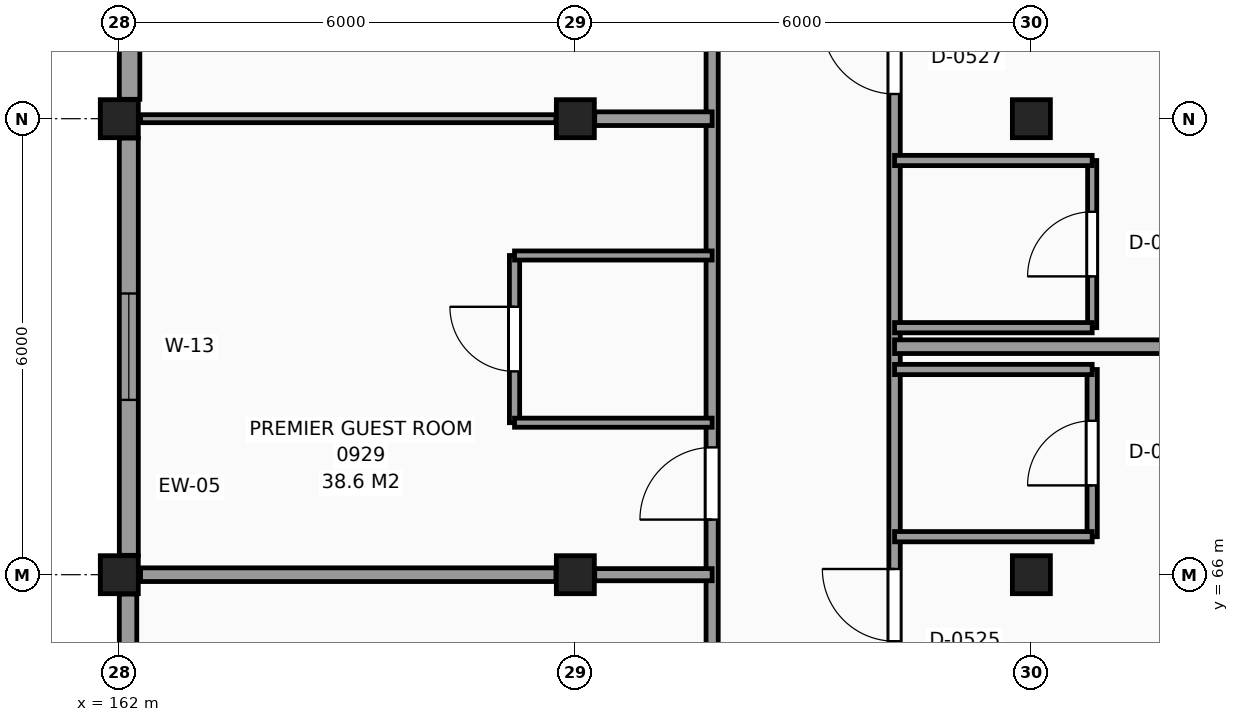
"""IFC4 building model, lengths in metres.
Left out: names, types, materials, properties, quantities, classifications, styles, units other than length and angle.
Written with IfcOpenShell. Run it as: python <this file> out.ifc"""

import sys

from ifc_helpers import new_model, si_unit, direction, frame, frame_2d, origin, origin_2d, place, context, subcontext, project, spatial, rectangle, extrude, element, fill, save


model = new_model("IFC4")
c1 = context("Model", 3, precision=1e-05, world=origin(), true_north=direction((0.0, 1.0)))
c2 = subcontext(c1, "Body", "Model", "MODEL_VIEW")
j1 = project(units=[si_unit("LENGTHUNIT", "METRE"), si_unit("PLANEANGLEUNIT", "RADIAN")], contexts=[c1])
p1 = place(None, origin())
s1 = spatial("IfcSite", under=j1, at=p1, CompositionType="ELEMENT")
p2 = place(p1, origin())
s2 = spatial("IfcBuilding", under=s1, at=p2, CompositionType="ELEMENT")
p3 = place(p2, frame((0.0, 0.0, 38.1)))
s3 = spatial("IfcBuildingStorey", under=s2, at=p3, CompositionType="ELEMENT", Elevation=38.1)
for number, where, z_axis, x_axis in (
    (1, (162.0, 66.0, 0.0), (0.0, 0.0, 1.0), (1.0, 0.0, 0.0)),
    (2, (162.0, 72.0, 0.0), (0.0, 0.0, 1.0), (1.0, 0.0, 0.0)),
    (3, (168.0, 66.0, 0.0), (0.0, 0.0, 1.0), (1.0, 0.0, 0.0)),
    (4, (168.0, 72.0, 0.0), (0.0, 0.0, 1.0), (1.0, 0.0, 0.0)),
    (5, (174.0, 66.0, 0.0), (0.0, 0.0, 1.0), (1.0, 0.0, 0.0)),
    (6, (174.0, 72.0, 0.0), (0.0, 0.0, 1.0), (1.0, 0.0, 0.0)),
):
    element("IfcColumn", number, at=place(p3, frame(where, z_axis=z_axis, x_axis=x_axis)), inside=s3, PredefinedType="COLUMN", context=c2, shape_type="SweptSolid", body=[
        extrude(rectangle(XDim=0.5, YDim=0.5, at=origin_2d()), origin(), (0.0, 0.0, 1.0), 3.3),
    ])
p4 = place(p3, frame((162.135, 77.745, 0.0), z_axis=(0.0, 0.0, 1.0), x_axis=(0.0, -1.0, 0.0)))
e7 = element("IfcWall", 7, at=p4, inside=s3, PredefinedType="SOLIDWALL", context=c2, shape_type="SweptSolid", body=[
    extrude(rectangle(XDim=5.49, YDim=0.27, at=frame_2d((2.745, 0.0))), origin(), (0.0, 0.0, 1.0), 2.41),
])
p5 = place(p3, frame((162.125, 71.745, 0.0), z_axis=(0.0, 0.0, 1.0), x_axis=(0.0, -1.0, 0.0)))
e8 = element("IfcWall", 8, at=p5, inside=s3, PredefinedType="SOLIDWALL", context=c2, shape_type="SweptSolid", body=[
    extrude(rectangle(XDim=5.49, YDim=0.25, at=frame_2d((2.745, 0.0))), origin(), (0.0, 0.0, 1.0), 2.41),
])
p6 = place(p5, frame((2.045, 0.0, 0.8)))
e9 = element("IfcOpeningElement", 9, at=p6, cuts=e8, PredefinedType="OPENING", context=c2, shape_type="SweptSolid", body=[
    extrude(rectangle(XDim=1.4, YDim=1.4, at=frame_2d((0.7, 0.7))), frame((0.0, 0.135, 0.0), z_axis=(0.0, -1.0, 0.0), x_axis=(1.0, 0.0, 0.0)), (0.0, 0.0, 1.0), 0.27),
])
p7 = place(p3, frame((162.115, 65.745, 0.0), z_axis=(0.0, 0.0, 1.0), x_axis=(0.0, -1.0, 0.0)))
e10 = element("IfcWall", 10, at=p7, inside=s3, PredefinedType="SOLIDWALL", context=c2, shape_type="SweptSolid", body=[
    extrude(rectangle(XDim=5.49, YDim=0.23, at=frame_2d((2.745, 0.0))), origin(), (0.0, 0.0, 1.0), 2.41),
])
p8 = place(p7, frame((2.045, 0.0, 0.8)))
e11 = element("IfcOpeningElement", 11, at=p8, cuts=e10, PredefinedType="OPENING", context=c2, shape_type="SweptSolid", body=[
    extrude(rectangle(XDim=1.4, YDim=1.4, at=frame_2d((0.7, 0.7))), frame((0.0, 0.125, 0.0), z_axis=(0.0, -1.0, 0.0), x_axis=(1.0, 0.0, 0.0)), (0.0, 0.0, 1.0), 0.25),
])
p9 = place(p3, frame((167.2, 68.0, 0.0), z_axis=(0.0, 0.0, 1.0), x_axis=(0.0, 1.0, 0.0)))
e12 = element("IfcWall", 12, at=p9, inside=s3, PredefinedType="PARTITIONING", context=c2, shape_type="SweptSolid", body=[
    extrude(rectangle(XDim=2.2, YDim=0.135, at=frame_2d((1.1, 0.0))), origin(), (0.0, 0.0, 1.0), 3.06),
])
p10 = place(p9, frame((0.675, 0.0, 0.0)))
e13 = element("IfcOpeningElement", 13, at=p10, cuts=e12, PredefinedType="OPENING", context=c2, shape_type="SweptSolid", body=[
    extrude(rectangle(XDim=0.85, YDim=2.1, at=frame_2d((0.425, 1.05))), frame((0.0, 0.078, 0.0), z_axis=(0.0, -1.0, 0.0), x_axis=(1.0, 0.0, 0.0)), (0.0, 0.0, 1.0), 0.155),
])
p11 = place(p3, frame((169.8, 42.215, 0.0), z_axis=(0.0, 0.0, 1.0), x_axis=(0.0, 1.0, 0.0)))
e14 = element("IfcWall", 14, at=p11, inside=s3, PredefinedType="PARTITIONING", context=c2, shape_type="SweptSolid", body=[
    extrude(rectangle(XDim=65.605, YDim=0.16, at=frame_2d((32.802, 0.0))), origin(), (0.0, 0.0, 1.0), 3.06),
])
p12 = place(p11, frame((50.185, 0.0, 0.0)))
e15 = element("IfcOpeningElement", 15, at=p12, cuts=e14, PredefinedType="OPENING", context=c2, shape_type="SweptSolid", body=[
    extrude(rectangle(XDim=1.2, YDim=2.2, at=frame_2d((0.6, 1.1))), frame((0.0, 0.09, 0.0), z_axis=(0.0, -1.0, 0.0), x_axis=(1.0, 0.0, 0.0)), (0.0, 0.0, 1.0), 0.18),
])
p13 = place(p11, frame((32.285, 0.0, 0.0)))
e16 = element("IfcOpeningElement", 16, at=p13, cuts=e14, PredefinedType="OPENING", context=c2, shape_type="SweptSolid", body=[
    extrude(rectangle(XDim=1.0, YDim=2.15, at=frame_2d((0.5, 1.075))), frame((0.0, 0.09, 0.0), z_axis=(0.0, -1.0, 0.0), x_axis=(1.0, 0.0, 0.0)), (0.0, 0.0, 1.0), 0.18),
])
p14 = place(p11, frame((0.46, 0.0, 0.0)))
e17 = element("IfcOpeningElement", 17, at=p14, cuts=e14, PredefinedType="OPENING", context=c2, shape_type="SweptSolid", body=[
    extrude(rectangle(XDim=0.95, YDim=2.1, at=frame_2d((0.475, 1.05))), frame((0.0, 0.09, 0.0), z_axis=(0.0, -1.0, 0.0), x_axis=(1.0, 0.0, 0.0)), (0.0, 0.0, 1.0), 0.18),
])
p15 = place(p11, frame((6.51, 0.0, 0.0)))
e18 = element("IfcOpeningElement", 18, at=p15, cuts=e14, PredefinedType="OPENING", context=c2, shape_type="SweptSolid", body=[
    extrude(rectangle(XDim=0.95, YDim=2.1, at=frame_2d((0.475, 1.05))), frame((0.0, 0.09, 0.0), z_axis=(0.0, -1.0, 0.0), x_axis=(1.0, 0.0, 0.0)), (0.0, 0.0, 1.0), 0.18),
])
p16 = place(p11, frame((12.51, 0.0, 0.0)))
e19 = element("IfcOpeningElement", 19, at=p16, cuts=e14, PredefinedType="OPENING", context=c2, shape_type="SweptSolid", body=[
    extrude(rectangle(XDim=0.95, YDim=2.1, at=frame_2d((0.475, 1.05))), frame((0.0, 0.09, 0.0), z_axis=(0.0, -1.0, 0.0), x_axis=(1.0, 0.0, 0.0)), (0.0, 0.0, 1.0), 0.18),
])
p17 = place(p11, frame((18.51, 0.0, 0.0)))
e20 = element("IfcOpeningElement", 20, at=p17, cuts=e14, PredefinedType="OPENING", context=c2, shape_type="SweptSolid", body=[
    extrude(rectangle(XDim=0.95, YDim=2.1, at=frame_2d((0.475, 1.05))), frame((0.0, 0.09, 0.0), z_axis=(0.0, -1.0, 0.0), x_axis=(1.0, 0.0, 0.0)), (0.0, 0.0, 1.0), 0.18),
])
p18 = place(p11, frame((24.51, 0.0, 0.0)))
e21 = element("IfcOpeningElement", 21, at=p18, cuts=e14, PredefinedType="OPENING", context=c2, shape_type="SweptSolid", body=[
    extrude(rectangle(XDim=0.95, YDim=2.1, at=frame_2d((0.475, 1.05))), frame((0.0, 0.09, 0.0), z_axis=(0.0, -1.0, 0.0), x_axis=(1.0, 0.0, 0.0)), (0.0, 0.0, 1.0), 0.18),
])
p19 = place(p11, frame((54.51, 0.0, 0.0)))
e22 = element("IfcOpeningElement", 22, at=p19, cuts=e14, PredefinedType="OPENING", context=c2, shape_type="SweptSolid", body=[
    extrude(rectangle(XDim=0.95, YDim=2.1, at=frame_2d((0.475, 1.05))), frame((0.0, 0.09, 0.0), z_axis=(0.0, -1.0, 0.0), x_axis=(1.0, 0.0, 0.0)), (0.0, 0.0, 1.0), 0.18),
])
p20 = place(p11, frame((60.51, 0.0, 0.0)))
e23 = element("IfcOpeningElement", 23, at=p20, cuts=e14, PredefinedType="OPENING", context=c2, shape_type="SweptSolid", body=[
    extrude(rectangle(XDim=0.95, YDim=2.1, at=frame_2d((0.475, 1.05))), frame((0.0, 0.09, 0.0), z_axis=(0.0, -1.0, 0.0), x_axis=(1.0, 0.0, 0.0)), (0.0, 0.0, 1.0), 0.18),
])
p21 = place(p3, frame((172.2, 42.215, 0.0), z_axis=(0.0, 0.0, 1.0), x_axis=(0.0, 1.0, 0.0)))
e24 = element("IfcWall", 24, at=p21, inside=s3, PredefinedType="PARTITIONING", context=c2, shape_type="SweptSolid", body=[
    extrude(rectangle(XDim=65.605, YDim=0.15, at=frame_2d((32.802, 0.0))), origin(), (0.0, 0.0, 1.0), 3.06),
])
p22 = place(p21, frame((0.46, 0.0, 0.0)))
e25 = element("IfcOpeningElement", 25, at=p22, cuts=e24, PredefinedType="OPENING", context=c2, shape_type="SweptSolid", body=[
    extrude(rectangle(XDim=0.95, YDim=2.1, at=frame_2d((0.475, 1.05))), frame((0.0, 0.085, 0.0), z_axis=(0.0, -1.0, 0.0), x_axis=(1.0, 0.0, 0.0)), (0.0, 0.0, 1.0), 0.17),
])
p23 = place(p21, frame((4.91, 0.0, 0.0)))
e26 = element("IfcOpeningElement", 26, at=p23, cuts=e24, PredefinedType="OPENING", context=c2, shape_type="SweptSolid", body=[
    extrude(rectangle(XDim=0.95, YDim=2.1, at=frame_2d((0.475, 1.05))), frame((0.0, 0.085, 0.0), z_axis=(0.0, -1.0, 0.0), x_axis=(1.0, 0.0, 0.0)), (0.0, 0.0, 1.0), 0.17),
])
p24 = place(p21, frame((12.11, 0.0, 0.0)))
e27 = element("IfcOpeningElement", 27, at=p24, cuts=e24, PredefinedType="OPENING", context=c2, shape_type="SweptSolid", body=[
    extrude(rectangle(XDim=0.95, YDim=2.1, at=frame_2d((0.475, 1.05))), frame((0.0, 0.085, 0.0), z_axis=(0.0, -1.0, 0.0), x_axis=(1.0, 0.0, 0.0)), (0.0, 0.0, 1.0), 0.17),
])
p25 = place(p21, frame((20.36, 0.0, 0.0)))
e28 = element("IfcOpeningElement", 28, at=p25, cuts=e24, PredefinedType="OPENING", context=c2, shape_type="SweptSolid", body=[
    extrude(rectangle(XDim=0.95, YDim=2.1, at=frame_2d((0.475, 1.05))), frame((0.0, 0.085, 0.0), z_axis=(0.0, -1.0, 0.0), x_axis=(1.0, 0.0, 0.0)), (0.0, 0.0, 1.0), 0.17),
])
p26 = place(p21, frame((22.91, 0.0, 0.0)))
e29 = element("IfcOpeningElement", 29, at=p26, cuts=e24, PredefinedType="OPENING", context=c2, shape_type="SweptSolid", body=[
    extrude(rectangle(XDim=0.95, YDim=2.1, at=frame_2d((0.475, 1.05))), frame((0.0, 0.085, 0.0), z_axis=(0.0, -1.0, 0.0), x_axis=(1.0, 0.0, 0.0)), (0.0, 0.0, 1.0), 0.17),
])
p27 = place(p21, frame((30.11, 0.0, 0.0)))
e30 = element("IfcOpeningElement", 30, at=p27, cuts=e24, PredefinedType="OPENING", context=c2, shape_type="SweptSolid", body=[
    extrude(rectangle(XDim=0.95, YDim=2.1, at=frame_2d((0.475, 1.05))), frame((0.0, 0.085, 0.0), z_axis=(0.0, -1.0, 0.0), x_axis=(1.0, 0.0, 0.0)), (0.0, 0.0, 1.0), 0.17),
])
p28 = place(p21, frame((34.31, 0.0, 0.0)))
e31 = element("IfcOpeningElement", 31, at=p28, cuts=e24, PredefinedType="OPENING", context=c2, shape_type="SweptSolid", body=[
    extrude(rectangle(XDim=0.95, YDim=2.1, at=frame_2d((0.475, 1.05))), frame((0.0, 0.085, 0.0), z_axis=(0.0, -1.0, 0.0), x_axis=(1.0, 0.0, 0.0)), (0.0, 0.0, 1.0), 0.17),
])
p29 = place(p21, frame((43.61, 0.0, 0.0)))
e32 = element("IfcOpeningElement", 32, at=p29, cuts=e24, PredefinedType="OPENING", context=c2, shape_type="SweptSolid", body=[
    extrude(rectangle(XDim=0.95, YDim=2.1, at=frame_2d((0.475, 1.05))), frame((0.0, 0.085, 0.0), z_axis=(0.0, -1.0, 0.0), x_axis=(1.0, 0.0, 0.0)), (0.0, 0.0, 1.0), 0.17),
])
p30 = place(p21, frame((48.11, 0.0, 0.0)))
e33 = element("IfcOpeningElement", 33, at=p30, cuts=e24, PredefinedType="OPENING", context=c2, shape_type="SweptSolid", body=[
    extrude(rectangle(XDim=0.95, YDim=2.1, at=frame_2d((0.475, 1.05))), frame((0.0, 0.085, 0.0), z_axis=(0.0, -1.0, 0.0), x_axis=(1.0, 0.0, 0.0)), (0.0, 0.0, 1.0), 0.17),
])
p31 = place(p21, frame((52.31, 0.0, 0.0)))
e34 = element("IfcOpeningElement", 34, at=p31, cuts=e24, PredefinedType="OPENING", context=c2, shape_type="SweptSolid", body=[
    extrude(rectangle(XDim=0.95, YDim=2.1, at=frame_2d((0.475, 1.05))), frame((0.0, 0.085, 0.0), z_axis=(0.0, -1.0, 0.0), x_axis=(1.0, 0.0, 0.0)), (0.0, 0.0, 1.0), 0.17),
])
p32 = place(p21, frame((54.51, 0.0, 0.0)))
e35 = element("IfcOpeningElement", 35, at=p32, cuts=e24, PredefinedType="OPENING", context=c2, shape_type="SweptSolid", body=[
    extrude(rectangle(XDim=0.95, YDim=2.1, at=frame_2d((0.475, 1.05))), frame((0.0, 0.085, 0.0), z_axis=(0.0, -1.0, 0.0), x_axis=(1.0, 0.0, 0.0)), (0.0, 0.0, 1.0), 0.17),
])
p33 = place(p21, frame((60.51, 0.0, 0.0)))
e36 = element("IfcOpeningElement", 36, at=p33, cuts=e24, PredefinedType="OPENING", context=c2, shape_type="SweptSolid", body=[
    extrude(rectangle(XDim=0.95, YDim=2.1, at=frame_2d((0.475, 1.05))), frame((0.0, 0.085, 0.0), z_axis=(0.0, -1.0, 0.0), x_axis=(1.0, 0.0, 0.0)), (0.0, 0.0, 1.0), 0.17),
])
p34 = place(p3, frame((174.8, 66.5, 0.0), z_axis=(0.0, 0.0, 1.0), x_axis=(0.0, 1.0, 0.0)))
e37 = element("IfcWall", 37, at=p34, inside=s3, PredefinedType="PARTITIONING", context=c2, shape_type="SweptSolid", body=[
    extrude(rectangle(XDim=2.2, YDim=0.135, at=frame_2d((1.1, 0.0))), origin(), (0.0, 0.0, 1.0), 3.06),
])
p35 = place(p34, frame((0.675, 0.0, 0.0)))
e38 = element("IfcOpeningElement", 38, at=p35, cuts=e37, PredefinedType="OPENING", context=c2, shape_type="SweptSolid", body=[
    extrude(rectangle(XDim=0.85, YDim=2.1, at=frame_2d((0.425, 1.05))), frame((0.0, 0.078, 0.0), z_axis=(0.0, -1.0, 0.0), x_axis=(1.0, 0.0, 0.0)), (0.0, 0.0, 1.0), 0.155),
])
p36 = place(p3, frame((174.8, 69.25, 0.0), z_axis=(0.0, 0.0, 1.0), x_axis=(0.0, 1.0, 0.0)))
e39 = element("IfcWall", 39, at=p36, inside=s3, PredefinedType="PARTITIONING", context=c2, shape_type="SweptSolid", body=[
    extrude(rectangle(XDim=2.2, YDim=0.12, at=frame_2d((1.1, 0.0))), origin(), (0.0, 0.0, 1.0), 3.06),
])
p37 = place(p36, frame((0.675, 0.0, 0.0)))
e40 = element("IfcOpeningElement", 40, at=p37, cuts=e39, PredefinedType="OPENING", context=c2, shape_type="SweptSolid", body=[
    extrude(rectangle(XDim=0.85, YDim=2.1, at=frame_2d((0.425, 1.05))), frame((0.0, 0.07, 0.0), z_axis=(0.0, -1.0, 0.0), x_axis=(1.0, 0.0, 0.0)), (0.0, 0.0, 1.0), 0.14),
])
p38 = place(p3, frame((162.28, 66.0, 0.0), z_axis=(0.0, 0.0, 1.0), x_axis=(1.0, 0.0, 0.0)))
e41 = element("IfcWall", 41, at=p38, inside=s3, PredefinedType="PARTITIONING", context=c2, shape_type="SweptSolid", body=[
    extrude(rectangle(XDim=5.465, YDim=0.18, at=frame_2d((2.732, 0.0))), origin(), (0.0, 0.0, 1.0), 2.26),
])
p39 = place(p3, frame((168.255, 66.0, 0.0), z_axis=(0.0, 0.0, 1.0), x_axis=(1.0, 0.0, 0.0)))
e42 = element("IfcWall", 42, at=p39, inside=s3, PredefinedType="PARTITIONING", context=c2, shape_type="SweptSolid", body=[
    extrude(rectangle(XDim=1.545, YDim=0.16, at=frame_2d((0.772, 0.0))), origin(), (0.0, 0.0, 1.0), 2.26),
])
p40 = place(p3, frame((172.2, 66.5, 0.0), z_axis=(0.0, 0.0, 1.0), x_axis=(1.0, 0.0, 0.0)))
e43 = element("IfcWall", 43, at=p40, inside=s3, PredefinedType="PARTITIONING", context=c2, shape_type="SweptSolid", body=[
    extrude(rectangle(XDim=2.6, YDim=0.135, at=frame_2d((1.3, 0.0))), origin(), (0.0, 0.0, 1.0), 3.06),
])
p41 = place(p3, frame((167.2, 68.0, 0.0), z_axis=(0.0, 0.0, 1.0), x_axis=(1.0, 0.0, 0.0)))
e44 = element("IfcWall", 44, at=p41, inside=s3, PredefinedType="PARTITIONING", context=c2, shape_type="SweptSolid", body=[
    extrude(rectangle(XDim=2.6, YDim=0.12, at=frame_2d((1.3, 0.0))), origin(), (0.0, 0.0, 1.0), 3.06),
])
p42 = place(p3, frame((172.2, 68.7, 0.0), z_axis=(0.0, 0.0, 1.0), x_axis=(1.0, 0.0, 0.0)))
e45 = element("IfcWall", 45, at=p42, inside=s3, PredefinedType="PARTITIONING", context=c2, shape_type="SweptSolid", body=[
    extrude(rectangle(XDim=2.6, YDim=0.135, at=frame_2d((1.3, 0.0))), origin(), (0.0, 0.0, 1.0), 3.06),
])
p43 = place(p3, frame((172.2, 69.0, 0.0), z_axis=(0.0, 0.0, 1.0), x_axis=(1.0, 0.0, 0.0)))
e46 = element("IfcWall", 46, at=p43, inside=s3, PredefinedType="PARTITIONING", context=c2, shape_type="SweptSolid", body=[
    extrude(rectangle(XDim=7.585, YDim=0.18, at=frame_2d((3.792, 0.0))), origin(), (0.0, 0.0, 1.0), 3.06),
])
p44 = place(p3, frame((172.2, 69.25, 0.0), z_axis=(0.0, 0.0, 1.0), x_axis=(1.0, 0.0, 0.0)))
e47 = element("IfcWall", 47, at=p44, inside=s3, PredefinedType="PARTITIONING", context=c2, shape_type="SweptSolid", body=[
    extrude(rectangle(XDim=2.6, YDim=0.135, at=frame_2d((1.3, 0.0))), origin(), (0.0, 0.0, 1.0), 3.06),
])
p45 = place(p3, frame((167.2, 70.2, 0.0), z_axis=(0.0, 0.0, 1.0), x_axis=(1.0, 0.0, 0.0)))
e48 = element("IfcWall", 48, at=p45, inside=s3, PredefinedType="PARTITIONING", context=c2, shape_type="SweptSolid", body=[
    extrude(rectangle(XDim=2.6, YDim=0.12, at=frame_2d((1.3, 0.0))), origin(), (0.0, 0.0, 1.0), 3.06),
])
p46 = place(p3, frame((172.2, 71.45, 0.0), z_axis=(0.0, 0.0, 1.0), x_axis=(1.0, 0.0, 0.0)))
e49 = element("IfcWall", 49, at=p46, inside=s3, PredefinedType="PARTITIONING", context=c2, shape_type="SweptSolid", body=[
    extrude(rectangle(XDim=2.6, YDim=0.135, at=frame_2d((1.3, 0.0))), origin(), (0.0, 0.0, 1.0), 3.06),
])
p47 = place(p3, frame((162.28, 72.0, 0.0), z_axis=(0.0, 0.0, 1.0), x_axis=(1.0, 0.0, 0.0)))
e50 = element("IfcWall", 50, at=p47, inside=s3, PredefinedType="PARTITIONING", context=c2, shape_type="SweptSolid", body=[
    extrude(rectangle(XDim=5.465, YDim=0.105, at=frame_2d((2.732, 0.0))), origin(), (0.0, 0.0, 1.0), 2.26),
])
p48 = place(p3, frame((168.255, 72.0, 0.0), z_axis=(0.0, 0.0, 1.0), x_axis=(1.0, 0.0, 0.0)))
e51 = element("IfcWall", 51, at=p48, inside=s3, PredefinedType="PARTITIONING", context=c2, shape_type="SweptSolid", body=[
    extrude(rectangle(XDim=1.545, YDim=0.18, at=frame_2d((0.772, 0.0))), origin(), (0.0, 0.0, 1.0), 2.26),
])
p49 = place(p6, origin())
e52 = element("IfcWindow", 52, at=p49, inside=s3, PartitioningType="SINGLE_PANEL", PredefinedType="WINDOW", context=c2, shape_type="SweptSolid", body=[
    extrude(rectangle(XDim=1.4, YDim=1.4, at=frame_2d((0.7, 0.7))), frame((0.0, 0.03, 0.0), z_axis=(0.0, -1.0, 0.0), x_axis=(1.0, 0.0, 0.0)), (0.0, 0.0, 1.0), 0.06),
])
fill(e9, e52)
p50 = place(p35, origin())
e53 = element("IfcDoor", 53, at=p50, inside=s3, OperationType="SINGLE_SWING_LEFT", PredefinedType="DOOR", context=c2, shape_type="SweptSolid", body=[
    extrude(rectangle(XDim=0.85, YDim=2.1, at=frame_2d((0.425, 1.05))), frame((0.0, 0.025, 0.0), z_axis=(0.0, -1.0, 0.0), x_axis=(1.0, 0.0, 0.0)), (0.0, 0.0, 1.0), 0.05),
])
fill(e38, e53)
p51 = place(p26, origin())
e54 = element("IfcDoor", 54, at=p51, inside=s3, OperationType="SINGLE_SWING_RIGHT", PredefinedType="DOOR", context=c2, shape_type="SweptSolid", body=[
    extrude(rectangle(XDim=0.95, YDim=2.1, at=frame_2d((0.475, 1.05))), frame((0.0, 0.025, 0.0), z_axis=(0.0, -1.0, 0.0), x_axis=(1.0, 0.0, 0.0)), (0.0, 0.0, 1.0), 0.05),
])
fill(e29, e54)
p52 = place(p37, origin())
e55 = element("IfcDoor", 55, at=p52, inside=s3, OperationType="SINGLE_SWING_LEFT", PredefinedType="DOOR", context=c2, shape_type="SweptSolid", body=[
    extrude(rectangle(XDim=0.85, YDim=2.1, at=frame_2d((0.425, 1.05))), frame((0.0, 0.025, 0.0), z_axis=(0.0, -1.0, 0.0), x_axis=(1.0, 0.0, 0.0)), (0.0, 0.0, 1.0), 0.05),
])
fill(e40, e55)
p53 = place(p27, origin())
e56 = element("IfcDoor", 56, at=p53, inside=s3, OperationType="SINGLE_SWING_RIGHT", PredefinedType="DOOR", context=c2, shape_type="SweptSolid", body=[
    extrude(rectangle(XDim=0.95, YDim=2.1, at=frame_2d((0.475, 1.05))), frame((0.0, 0.025, 0.0), z_axis=(0.0, -1.0, 0.0), x_axis=(1.0, 0.0, 0.0)), (0.0, 0.0, 1.0), 0.05),
])
fill(e30, e56)
p54 = place(p10, origin())
e57 = element("IfcDoor", 57, at=p54, inside=s3, OperationType="SINGLE_SWING_RIGHT", PredefinedType="DOOR", context=c2, shape_type="SweptSolid", body=[
    extrude(rectangle(XDim=0.85, YDim=2.1, at=frame_2d((0.425, 1.05))), frame((0.0, 0.025, 0.0), z_axis=(0.0, -1.0, 0.0), x_axis=(1.0, 0.0, 0.0)), (0.0, 0.0, 1.0), 0.05),
])
fill(e13, e57)
p55 = place(p18, origin())
e58 = element("IfcDoor", 58, at=p55, inside=s3, OperationType="SINGLE_SWING_LEFT", PredefinedType="DOOR", context=c2, shape_type="SweptSolid", body=[
    extrude(rectangle(XDim=0.95, YDim=2.1, at=frame_2d((0.475, 1.05))), frame((0.0, 0.025, 0.0), z_axis=(0.0, -1.0, 0.0), x_axis=(1.0, 0.0, 0.0)), (0.0, 0.0, 1.0), 0.05),
])
fill(e21, e58)
save(model, sys.argv[1])
